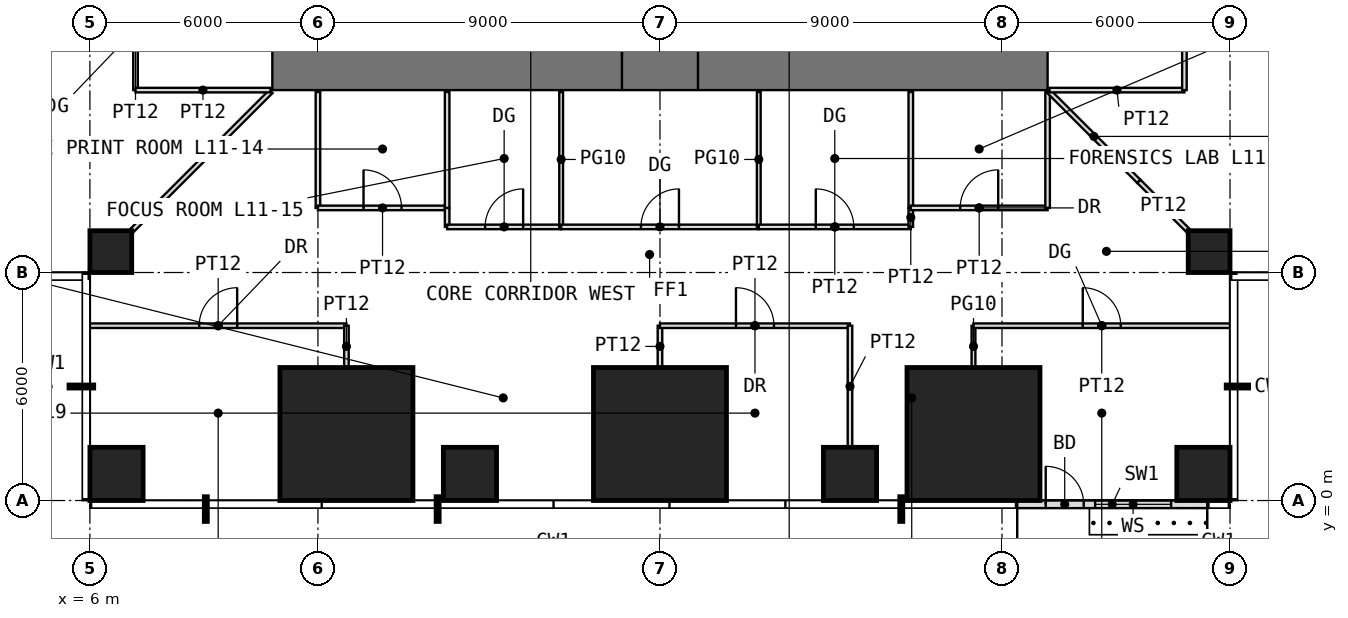
"""IFC4 building model, lengths in metres.
Left out: names, types, materials, properties, quantities, classifications, styles, units other than length and angle.
Written with IfcOpenShell. Run it as: python <this file> out.ifc"""

import sys

from ifc_helpers import new_model, si_unit, direction, frame, frame_2d, origin, origin_2d, place, context, subcontext, project, spatial, rectangle, extrude, element, fill, save


model = new_model("IFC4")
c1 = context("Model", 3, precision=1e-05, world=origin(), true_north=direction((0.0, 1.0)))
c2 = subcontext(c1, "Body", "Model", "MODEL_VIEW")
j1 = project(units=[si_unit("LENGTHUNIT", "METRE"), si_unit("PLANEANGLEUNIT", "RADIAN")], contexts=[c1])
p1 = place(None, origin())
s1 = spatial("IfcSite", under=j1, at=p1, CompositionType="ELEMENT")
p2 = place(p1, origin())
s2 = spatial("IfcBuilding", under=s1, at=p2, CompositionType="ELEMENT")
p3 = place(p2, frame((0.0, 0.0, 50.5)))
s3 = spatial("IfcBuildingStorey", under=s2, at=p3, CompositionType="ELEMENT", Elevation=50.5)
p4 = place(p3, frame((6.7, 0.7, 0.0), z_axis=(0.0, 0.0, 1.0), x_axis=(1.0, 0.0, 0.0)))
e1 = element("IfcColumn", 1, at=p4, inside=s3, PredefinedType="COLUMN", context=c2, shape_type="SweptSolid", body=[
    extrude(rectangle(XDim=1.4, YDim=1.4, at=origin_2d()), origin(), (0.0, 0.0, 1.0), 4.0),
])
p5 = place(p3, frame((12.75, 1.75, 0.0), z_axis=(0.0, 0.0, 1.0), x_axis=(1.0, 0.0, 0.0)))
e2 = element("IfcColumn", 2, at=p5, inside=s3, PredefinedType="COLUMN", context=c2, shape_type="SweptSolid", body=[
    extrude(rectangle(XDim=3.5, YDim=3.5, at=origin_2d()), origin(), (0.0, 0.0, 1.0), 4.0),
])
p6 = place(p3, frame((16.0, 0.7, 0.0), z_axis=(0.0, 0.0, 1.0), x_axis=(1.0, 0.0, 0.0)))
e3 = element("IfcColumn", 3, at=p6, inside=s3, PredefinedType="COLUMN", context=c2, shape_type="SweptSolid", body=[
    extrude(rectangle(XDim=1.4, YDim=1.4, at=origin_2d()), origin(), (0.0, 0.0, 1.0), 4.0),
])
p7 = place(p3, frame((21.0, 1.75, 0.0), z_axis=(0.0, 0.0, 1.0), x_axis=(1.0, 0.0, 0.0)))
e4 = element("IfcColumn", 4, at=p7, inside=s3, PredefinedType="COLUMN", context=c2, shape_type="SweptSolid", body=[
    extrude(rectangle(XDim=3.5, YDim=3.5, at=origin_2d()), origin(), (0.0, 0.0, 1.0), 4.0),
])
p8 = place(p3, frame((26.0, 0.7, 0.0), z_axis=(0.0, 0.0, 1.0), x_axis=(1.0, 0.0, 0.0)))
e5 = element("IfcColumn", 5, at=p8, inside=s3, PredefinedType="COLUMN", context=c2, shape_type="SweptSolid", body=[
    extrude(rectangle(XDim=1.4, YDim=1.4, at=origin_2d()), origin(), (0.0, 0.0, 1.0), 4.0),
])
p9 = place(p3, frame((29.25, 1.75, 0.0), z_axis=(0.0, 0.0, 1.0), x_axis=(1.0, 0.0, 0.0)))
e6 = element("IfcColumn", 6, at=p9, inside=s3, PredefinedType="COLUMN", context=c2, shape_type="SweptSolid", body=[
    extrude(rectangle(XDim=3.5, YDim=3.5, at=origin_2d()), origin(), (0.0, 0.0, 1.0), 4.0),
])
p10 = place(p3, frame((35.3, 0.7, 0.0), z_axis=(0.0, 0.0, 1.0), x_axis=(1.0, 0.0, 0.0)))
e7 = element("IfcColumn", 7, at=p10, inside=s3, PredefinedType="COLUMN", context=c2, shape_type="SweptSolid", body=[
    extrude(rectangle(XDim=1.4, YDim=1.4, at=origin_2d()), origin(), (0.0, 0.0, 1.0), 4.0),
])
for number, where, z_axis, x_axis in (
    (8, (6.55, 6.55, 0.0), (0.0, 0.0, 1.0), (1.0, 0.0, 0.0)),
    (9, (35.45, 6.55, 0.0), (0.0, 0.0, 1.0), (1.0, 0.0, 0.0)),
):
    element("IfcColumn", number, at=place(p3, frame(where, z_axis=z_axis, x_axis=x_axis)), inside=s3, PredefinedType="COLUMN", context=c2, shape_type="SweptSolid", body=[
        extrude(rectangle(XDim=1.1, YDim=1.1, at=origin_2d()), origin(), (0.0, 0.0, 1.0), 4.0),
    ])
p11 = place(p3, frame((30.4, -0.1, 0.0), z_axis=(0.0, 0.0, 1.0), x_axis=(1.0, 0.0, 0.0)))
e10 = element("IfcWall", 10, at=p11, inside=s3, PredefinedType="USERDEFINED", context=c2, shape_type="SweptSolid", body=[
    extrude(rectangle(XDim=5.0, YDim=0.2, at=frame_2d((2.5, 0.0))), origin(), (0.0, 0.0, 1.0), 3.75),
])
p12 = place(p11, frame((0.75, 0.0, 0.0)))
e11 = element("IfcOpeningElement", 11, at=p12, cuts=e10, PredefinedType="OPENING", context=c2, shape_type="SweptSolid", body=[
    extrude(rectangle(XDim=1.0, YDim=2.4, at=frame_2d((0.5, 1.2))), frame((0.0, 0.11, 0.0), z_axis=(0.0, -1.0, 0.0), x_axis=(1.0, 0.0, 0.0)), (0.0, 0.0, 1.0), 0.22),
])
p13 = place(p11, frame((2.05, 0.0, 0.3)))
e12 = element("IfcOpeningElement", 12, at=p13, cuts=e10, PredefinedType="OPENING", context=c2, shape_type="SweptSolid", body=[
    extrude(rectangle(XDim=2.0, YDim=2.7, at=frame_2d((1.0, 1.35))), frame((0.0, 0.11, 0.0), z_axis=(0.0, -1.0, 0.0), x_axis=(1.0, 0.0, 0.0)), (0.0, 0.0, 1.0), 0.22),
])
p14 = place(p3, frame((10.8, 11.7, -0.05), z_axis=(0.0, 0.0, 1.0), x_axis=(1.0, 0.0, 0.0)))
e13 = element("IfcWall", 13, at=p14, inside=s3, PredefinedType="SHEAR", context=c2, shape_type="SweptSolid", body=[
    extrude(rectangle(XDim=20.4, YDim=1.8, at=frame_2d((10.2, 0.0))), origin(), (0.0, 0.0, 1.0), 4.0),
])
p15 = place(p14, frame((9.2, 0.0, 0.05)))
e14 = element("IfcOpeningElement", 14, at=p15, cuts=e13, PredefinedType="OPENING", context=c2, shape_type="SweptSolid", body=[
    extrude(rectangle(XDim=2.0, YDim=2.2, at=frame_2d((1.0, 1.1))), frame((0.0, 0.91, 0.0), z_axis=(0.0, -1.0, 0.0), x_axis=(1.0, 0.0, 0.0)), (0.0, 0.0, 1.0), 1.82),
])
p16 = place(p3, frame((6.0, 4.6, 0.0), z_axis=(0.0, 0.0, 1.0), x_axis=(1.0, 0.0, 0.0)))
e15 = element("IfcWall", 15, at=p16, inside=s3, PredefinedType="PARTITIONING", context=c2, shape_type="SweptSolid", body=[
    extrude(rectangle(XDim=6.75, YDim=0.12, at=frame_2d((3.375, 0.0))), origin(), (0.0, 0.0, 1.0), 3.75),
])
p17 = place(p16, frame((2.875, 0.0, 0.0)))
e16 = element("IfcOpeningElement", 16, at=p17, cuts=e15, PredefinedType="OPENING", context=c2, shape_type="SweptSolid", body=[
    extrude(rectangle(XDim=1.0, YDim=2.2, at=frame_2d((0.5, 1.1))), frame((0.0, 0.07, 0.0), z_axis=(0.0, -1.0, 0.0), x_axis=(1.0, 0.0, 0.0)), (0.0, 0.0, 1.0), 0.14),
])
p18 = place(p3, frame((7.11, 7.11, 0.0), z_axis=(0.0, 0.0, 1.0), x_axis=(0.707106781187, 0.707106781187, 0.0)))
e17 = element("IfcWall", 17, at=p18, inside=s3, PredefinedType="PARTITIONING", context=c2, shape_type="SweptSolid", body=[
    extrude(rectangle(XDim=5.168, YDim=0.12, at=frame_2d((2.584, 0.0))), origin(), (0.0, 0.0, 1.0), 3.75),
])
p19 = place(p3, frame((7.2, 10.8, 0.0), z_axis=(0.0, 0.0, 1.0), x_axis=(0.0, 1.0, 0.0)))
e18 = element("IfcWall", 18, at=p19, inside=s3, PredefinedType="PARTITIONING", context=c2, shape_type="SweptSolid", body=[
    extrude(rectangle(XDim=3.2, YDim=0.12, at=frame_2d((1.6, 0.0))), origin(), (0.0, 0.0, 1.0), 3.75),
])
p20 = place(p19, frame((1.1, 0.0, 0.0)))
e19 = element("IfcOpeningElement", 19, at=p20, cuts=e18, PredefinedType="OPENING", context=c2, shape_type="SweptSolid", body=[
    extrude(rectangle(XDim=1.0, YDim=2.4, at=frame_2d((0.5, 1.2))), frame((0.0, 0.07, 0.0), z_axis=(0.0, -1.0, 0.0), x_axis=(1.0, 0.0, 0.0)), (0.0, 0.0, 1.0), 0.14),
])
p21 = place(p3, frame((7.2, 10.8, 0.0), z_axis=(0.0, 0.0, 1.0), x_axis=(1.0, 0.0, 0.0)))
e20 = element("IfcWall", 20, at=p21, inside=s3, PredefinedType="PARTITIONING", context=c2, shape_type="SweptSolid", body=[
    extrude(rectangle(XDim=3.55, YDim=0.12, at=frame_2d((1.775, 0.0))), origin(), (0.0, 0.0, 1.0), 3.75),
])
p22 = place(p3, frame((12.0, 7.7, 0.0), z_axis=(0.0, 0.0, 1.0), x_axis=(0.0, 1.0, 0.0)))
e21 = element("IfcWall", 21, at=p22, inside=s3, PredefinedType="PARTITIONING", context=c2, shape_type="SweptSolid", body=[
    extrude(rectangle(XDim=3.05, YDim=0.12, at=frame_2d((1.525, 0.0))), origin(), (0.0, 0.0, 1.0), 3.75),
])
p23 = place(p3, frame((12.0, 7.7, 0.0), z_axis=(0.0, 0.0, 1.0), x_axis=(1.0, 0.0, 0.0)))
e22 = element("IfcWall", 22, at=p23, inside=s3, PredefinedType="PARTITIONING", context=c2, shape_type="SweptSolid", body=[
    extrude(rectangle(XDim=3.4, YDim=0.12, at=frame_2d((1.7, 0.0))), origin(), (0.0, 0.0, 1.0), 3.75),
])
p24 = place(p23, frame((1.2, 0.0, 0.0)))
e23 = element("IfcOpeningElement", 23, at=p24, cuts=e22, PredefinedType="OPENING", context=c2, shape_type="SweptSolid", body=[
    extrude(rectangle(XDim=1.0, YDim=2.2, at=frame_2d((0.5, 1.1))), frame((0.0, 0.07, 0.0), z_axis=(0.0, -1.0, 0.0), x_axis=(1.0, 0.0, 0.0)), (0.0, 0.0, 1.0), 0.14),
])
p25 = place(p3, frame((12.75, 3.51, 0.0), z_axis=(0.0, 0.0, 1.0), x_axis=(0.0, 1.0, 0.0)))
e24 = element("IfcWall", 24, at=p25, inside=s3, PredefinedType="PARTITIONING", context=c2, shape_type="SweptSolid", body=[
    extrude(rectangle(XDim=1.09, YDim=0.12, at=frame_2d((0.545, 0.0))), origin(), (0.0, 0.0, 1.0), 3.75),
])
p26 = place(p3, frame((15.4, 7.2, 0.0), z_axis=(0.0, 0.0, 1.0), x_axis=(0.0, 1.0, 0.0)))
e25 = element("IfcWall", 25, at=p26, inside=s3, PredefinedType="PARTITIONING", context=c2, shape_type="SweptSolid", body=[
    extrude(rectangle(XDim=0.5, YDim=0.12, at=frame_2d((0.25, 0.0))), origin(), (0.0, 0.0, 1.0), 3.75),
])
p27 = place(p3, frame((15.4, 7.2, 0.0), z_axis=(0.0, 0.0, 1.0), x_axis=(1.0, 0.0, 0.0)))
e26 = element("IfcWall", 26, at=p27, inside=s3, PredefinedType="PARTITIONING", context=c2, shape_type="SweptSolid", body=[
    extrude(rectangle(XDim=3.0, YDim=0.12, at=frame_2d((1.5, 0.0))), origin(), (0.0, 0.0, 1.0), 3.75),
])
p28 = place(p27, frame((1.0, 0.0, 0.0)))
e27 = element("IfcOpeningElement", 27, at=p28, cuts=e26, PredefinedType="OPENING", context=c2, shape_type="SweptSolid", body=[
    extrude(rectangle(XDim=1.0, YDim=2.4, at=frame_2d((0.5, 1.2))), frame((0.0, 0.07, 0.0), z_axis=(0.0, -1.0, 0.0), x_axis=(1.0, 0.0, 0.0)), (0.0, 0.0, 1.0), 0.14),
])
p29 = place(p3, frame((15.4, 7.7, 0.0), z_axis=(0.0, 0.0, 1.0), x_axis=(0.0, 1.0, 0.0)))
e28 = element("IfcWall", 28, at=p29, inside=s3, PredefinedType="PARTITIONING", context=c2, shape_type="SweptSolid", body=[
    extrude(rectangle(XDim=3.05, YDim=0.12, at=frame_2d((1.525, 0.0))), origin(), (0.0, 0.0, 1.0), 3.75),
])
p30 = place(p3, frame((18.4, 7.2, 0.0), z_axis=(0.0, 0.0, 1.0), x_axis=(0.0, 1.0, 0.0)))
e29 = element("IfcWall", 29, at=p30, inside=s3, PredefinedType="PARTITIONING", context=c2, shape_type="SweptSolid", body=[
    extrude(rectangle(XDim=3.55, YDim=0.1, at=frame_2d((1.775, 0.0))), origin(), (0.0, 0.0, 1.0), 3.75),
])
p31 = place(p3, frame((18.4, 7.2, 0.0), z_axis=(0.0, 0.0, 1.0), x_axis=(1.0, 0.0, 0.0)))
e30 = element("IfcWall", 30, at=p31, inside=s3, PredefinedType="PARTITIONING", context=c2, shape_type="SweptSolid", body=[
    extrude(rectangle(XDim=5.2, YDim=0.12, at=frame_2d((2.6, 0.0))), origin(), (0.0, 0.0, 1.0), 3.75),
])
p32 = place(p31, frame((2.1, 0.0, 0.0)))
e31 = element("IfcOpeningElement", 31, at=p32, cuts=e30, PredefinedType="OPENING", context=c2, shape_type="SweptSolid", body=[
    extrude(rectangle(XDim=1.0, YDim=2.4, at=frame_2d((0.5, 1.2))), frame((0.0, 0.07, 0.0), z_axis=(0.0, -1.0, 0.0), x_axis=(1.0, 0.0, 0.0)), (0.0, 0.0, 1.0), 0.14),
])
p33 = place(p3, frame((21.0, 3.51, 0.0), z_axis=(0.0, 0.0, 1.0), x_axis=(0.0, 1.0, 0.0)))
e32 = element("IfcWall", 32, at=p33, inside=s3, PredefinedType="PARTITIONING", context=c2, shape_type="SweptSolid", body=[
    extrude(rectangle(XDim=1.09, YDim=0.12, at=frame_2d((0.545, 0.0))), origin(), (0.0, 0.0, 1.0), 3.75),
])
p34 = place(p3, frame((21.0, 4.6, 0.0), z_axis=(0.0, 0.0, 1.0), x_axis=(1.0, 0.0, 0.0)))
e33 = element("IfcWall", 33, at=p34, inside=s3, PredefinedType="PARTITIONING", context=c2, shape_type="SweptSolid", body=[
    extrude(rectangle(XDim=5.0, YDim=0.12, at=frame_2d((2.5, 0.0))), origin(), (0.0, 0.0, 1.0), 3.75),
])
p35 = place(p34, frame((2.0, 0.0, 0.0)))
e34 = element("IfcOpeningElement", 34, at=p35, cuts=e33, PredefinedType="OPENING", context=c2, shape_type="SweptSolid", body=[
    extrude(rectangle(XDim=1.0, YDim=2.2, at=frame_2d((0.5, 1.1))), frame((0.0, 0.07, 0.0), z_axis=(0.0, -1.0, 0.0), x_axis=(1.0, 0.0, 0.0)), (0.0, 0.0, 1.0), 0.14),
])
p36 = place(p3, frame((23.6, 7.2, 0.0), z_axis=(0.0, 0.0, 1.0), x_axis=(0.0, 1.0, 0.0)))
e35 = element("IfcWall", 35, at=p36, inside=s3, PredefinedType="PARTITIONING", context=c2, shape_type="SweptSolid", body=[
    extrude(rectangle(XDim=3.55, YDim=0.1, at=frame_2d((1.775, 0.0))), origin(), (0.0, 0.0, 1.0), 3.75),
])
p37 = place(p3, frame((23.6, 7.2, 0.0), z_axis=(0.0, 0.0, 1.0), x_axis=(1.0, 0.0, 0.0)))
e36 = element("IfcWall", 36, at=p37, inside=s3, PredefinedType="PARTITIONING", context=c2, shape_type="SweptSolid", body=[
    extrude(rectangle(XDim=4.0, YDim=0.12, at=frame_2d((2.0, 0.0))), origin(), (0.0, 0.0, 1.0), 3.75),
])
p38 = place(p37, frame((1.5, 0.0, 0.0)))
e37 = element("IfcOpeningElement", 37, at=p38, cuts=e36, PredefinedType="OPENING", context=c2, shape_type="SweptSolid", body=[
    extrude(rectangle(XDim=1.0, YDim=2.4, at=frame_2d((0.5, 1.2))), frame((0.0, 0.07, 0.0), z_axis=(0.0, -1.0, 0.0), x_axis=(1.0, 0.0, 0.0)), (0.0, 0.0, 1.0), 0.14),
])
p39 = place(p3, frame((26.0, 1.41, 0.0), z_axis=(0.0, 0.0, 1.0), x_axis=(0.0, 1.0, 0.0)))
e38 = element("IfcWall", 38, at=p39, inside=s3, PredefinedType="PARTITIONING", context=c2, shape_type="SweptSolid", body=[
    extrude(rectangle(XDim=3.19, YDim=0.12, at=frame_2d((1.595, 0.0))), origin(), (0.0, 0.0, 1.0), 3.75),
])
p40 = place(p3, frame((27.6, 7.2, 0.0), z_axis=(0.0, 0.0, 1.0), x_axis=(0.0, 1.0, 0.0)))
e39 = element("IfcWall", 39, at=p40, inside=s3, PredefinedType="PARTITIONING", context=c2, shape_type="SweptSolid", body=[
    extrude(rectangle(XDim=0.5, YDim=0.12, at=frame_2d((0.25, 0.0))), origin(), (0.0, 0.0, 1.0), 3.75),
])
p41 = place(p3, frame((27.6, 7.7, 0.0), z_axis=(0.0, 0.0, 1.0), x_axis=(0.0, 1.0, 0.0)))
e40 = element("IfcWall", 40, at=p41, inside=s3, PredefinedType="PARTITIONING", context=c2, shape_type="SweptSolid", body=[
    extrude(rectangle(XDim=3.05, YDim=0.12, at=frame_2d((1.525, 0.0))), origin(), (0.0, 0.0, 1.0), 3.75),
])
p42 = place(p3, frame((27.6, 7.7, 0.0), z_axis=(0.0, 0.0, 1.0), x_axis=(1.0, 0.0, 0.0)))
e41 = element("IfcWall", 41, at=p42, inside=s3, PredefinedType="PARTITIONING", context=c2, shape_type="SweptSolid", body=[
    extrude(rectangle(XDim=3.6, YDim=0.12, at=frame_2d((1.8, 0.0))), origin(), (0.0, 0.0, 1.0), 3.75),
])
p43 = place(p42, frame((1.3, 0.0, 0.0)))
e42 = element("IfcOpeningElement", 42, at=p43, cuts=e41, PredefinedType="OPENING", context=c2, shape_type="SweptSolid", body=[
    extrude(rectangle(XDim=1.0, YDim=2.2, at=frame_2d((0.5, 1.1))), frame((0.0, 0.07, 0.0), z_axis=(0.0, -1.0, 0.0), x_axis=(1.0, 0.0, 0.0)), (0.0, 0.0, 1.0), 0.14),
])
p44 = place(p3, frame((29.25, 3.51, 0.0), z_axis=(0.0, 0.0, 1.0), x_axis=(0.0, 1.0, 0.0)))
e43 = element("IfcWall", 43, at=p44, inside=s3, PredefinedType="PARTITIONING", context=c2, shape_type="SweptSolid", body=[
    extrude(rectangle(XDim=1.09, YDim=0.1, at=frame_2d((0.545, 0.0))), origin(), (0.0, 0.0, 1.0), 3.75),
])
p45 = place(p3, frame((29.25, 4.6, 0.0), z_axis=(0.0, 0.0, 1.0), x_axis=(1.0, 0.0, 0.0)))
e44 = element("IfcWall", 44, at=p45, inside=s3, PredefinedType="PARTITIONING", context=c2, shape_type="SweptSolid", body=[
    extrude(rectangle(XDim=6.75, YDim=0.12, at=frame_2d((3.375, 0.0))), origin(), (0.0, 0.0, 1.0), 3.75),
])
p46 = place(p45, frame((2.875, 0.0, 0.0)))
e45 = element("IfcOpeningElement", 45, at=p46, cuts=e44, PredefinedType="OPENING", context=c2, shape_type="SweptSolid", body=[
    extrude(rectangle(XDim=1.0, YDim=2.4, at=frame_2d((0.5, 1.2))), frame((0.0, 0.07, 0.0), z_axis=(0.0, -1.0, 0.0), x_axis=(1.0, 0.0, 0.0)), (0.0, 0.0, 1.0), 0.14),
])
p47 = place(p3, frame((31.2, 7.7, 0.0), z_axis=(0.0, 0.0, 1.0), x_axis=(0.0, 1.0, 0.0)))
e46 = element("IfcWall", 46, at=p47, inside=s3, PredefinedType="PARTITIONING", context=c2, shape_type="SweptSolid", body=[
    extrude(rectangle(XDim=3.05, YDim=0.12, at=frame_2d((1.525, 0.0))), origin(), (0.0, 0.0, 1.0), 3.75),
])
p48 = place(p3, frame((31.235, 10.765, 0.0), z_axis=(0.0, 0.0, 1.0), x_axis=(0.707106781187, -0.707106781187, 0.0)))
e47 = element("IfcWall", 47, at=p48, inside=s3, PredefinedType="PARTITIONING", context=c2, shape_type="SweptSolid", body=[
    extrude(rectangle(XDim=3.346, YDim=0.12, at=frame_2d((1.673, 0.0))), origin(), (0.0, 0.0, 1.0), 3.75),
])
p49 = place(p3, frame((31.25, 10.8, 0.0), z_axis=(0.0, 0.0, 1.0), x_axis=(1.0, 0.0, 0.0)))
e48 = element("IfcWall", 48, at=p49, inside=s3, PredefinedType="PARTITIONING", context=c2, shape_type="SweptSolid", body=[
    extrude(rectangle(XDim=3.55, YDim=0.12, at=frame_2d((1.775, 0.0))), origin(), (0.0, 0.0, 1.0), 3.75),
])
p50 = place(p3, frame((33.602, 8.398, 0.0), z_axis=(0.0, 0.0, 1.0), x_axis=(0.707106781187, -0.707106781187, 0.0)))
e49 = element("IfcWall", 49, at=p50, inside=s3, PredefinedType="PARTITIONING", context=c2, shape_type="SweptSolid", body=[
    extrude(rectangle(XDim=1.822, YDim=0.12, at=frame_2d((0.911, 0.0))), origin(), (0.0, 0.0, 1.0), 3.75),
])
p51 = place(p3, frame((34.8, 10.8, 0.0), z_axis=(0.0, 0.0, 1.0), x_axis=(0.0, 1.0, 0.0)))
e50 = element("IfcWall", 50, at=p51, inside=s3, PredefinedType="PARTITIONING", context=c2, shape_type="SweptSolid", body=[
    extrude(rectangle(XDim=3.3, YDim=0.12, at=frame_2d((1.65, 0.0))), origin(), (0.0, 0.0, 1.0), 3.75),
])
p52 = place(p51, frame((1.15, 0.0, 0.0)))
e51 = element("IfcOpeningElement", 51, at=p52, cuts=e50, PredefinedType="OPENING", context=c2, shape_type="SweptSolid", body=[
    extrude(rectangle(XDim=1.0, YDim=2.2, at=frame_2d((0.5, 1.1))), frame((0.0, 0.07, 0.0), z_axis=(0.0, -1.0, 0.0), x_axis=(1.0, 0.0, 0.0)), (0.0, 0.0, 1.0), 0.14),
])
p53 = place(p12, origin())
e52 = element("IfcDoor", 52, at=p53, inside=s3, OperationType="SINGLE_SWING_LEFT", PredefinedType="DOOR", context=c2, shape_type="SweptSolid", body=[
    extrude(rectangle(XDim=1.0, YDim=2.4, at=frame_2d((0.5, 1.2))), frame((0.0, 0.025, 0.0), z_axis=(0.0, -1.0, 0.0), x_axis=(1.0, 0.0, 0.0)), (0.0, 0.0, 1.0), 0.05),
])
fill(e11, e52)
p54 = place(p13, origin())
e53 = element("IfcWindow", 53, at=p54, inside=s3, PartitioningType="SINGLE_PANEL", PredefinedType="WINDOW", context=c2, shape_type="SweptSolid", body=[
    extrude(rectangle(XDim=2.0, YDim=2.7, at=frame_2d((1.0, 1.35))), frame((0.0, 0.03, 0.0), z_axis=(0.0, -1.0, 0.0), x_axis=(1.0, 0.0, 0.0)), (0.0, 0.0, 1.0), 0.06),
])
fill(e12, e53)
p55 = place(p15, origin())
e54 = element("IfcDoor", 54, at=p55, inside=s3, OperationType="DOUBLE_DOOR_SINGLE_SWING", PredefinedType="DOOR", context=c2, shape_type="SweptSolid", body=[
    extrude(rectangle(XDim=2.0, YDim=2.2, at=frame_2d((1.0, 1.1))), frame((0.0, 0.025, 0.0), z_axis=(0.0, -1.0, 0.0), x_axis=(1.0, 0.0, 0.0)), (0.0, 0.0, 1.0), 0.05),
])
fill(e14, e54)
p56 = place(p24, origin())
e55 = element("IfcDoor", 55, at=p56, inside=s3, OperationType="SINGLE_SWING_LEFT", PredefinedType="DOOR", context=c2, shape_type="SweptSolid", body=[
    extrude(rectangle(XDim=1.0, YDim=2.2, at=frame_2d((0.5, 1.1))), frame((0.0, 0.025, 0.0), z_axis=(0.0, -1.0, 0.0), x_axis=(1.0, 0.0, 0.0)), (0.0, 0.0, 1.0), 0.05),
])
fill(e23, e55)
p57 = place(p28, origin())
e56 = element("IfcDoor", 56, at=p57, inside=s3, OperationType="SINGLE_SWING_RIGHT", PredefinedType="DOOR", context=c2, shape_type="SweptSolid", body=[
    extrude(rectangle(XDim=1.0, YDim=2.4, at=frame_2d((0.5, 1.2))), frame((0.0, 0.025, 0.0), z_axis=(0.0, -1.0, 0.0), x_axis=(1.0, 0.0, 0.0)), (0.0, 0.0, 1.0), 0.05),
])
fill(e27, e56)
p58 = place(p38, origin())
e57 = element("IfcDoor", 57, at=p58, inside=s3, OperationType="SINGLE_SWING_LEFT", PredefinedType="DOOR", context=c2, shape_type="SweptSolid", body=[
    extrude(rectangle(XDim=1.0, YDim=2.4, at=frame_2d((0.5, 1.2))), frame((0.0, 0.025, 0.0), z_axis=(0.0, -1.0, 0.0), x_axis=(1.0, 0.0, 0.0)), (0.0, 0.0, 1.0), 0.05),
])
fill(e37, e57)
p59 = place(p43, origin())
e58 = element("IfcDoor", 58, at=p59, inside=s3, OperationType="SINGLE_SWING_RIGHT", PredefinedType="DOOR", context=c2, shape_type="SweptSolid", body=[
    extrude(rectangle(XDim=1.0, YDim=2.2, at=frame_2d((0.5, 1.1))), frame((0.0, 0.025, 0.0), z_axis=(0.0, -1.0, 0.0), x_axis=(1.0, 0.0, 0.0)), (0.0, 0.0, 1.0), 0.05),
])
fill(e42, e58)
p60 = place(p17, origin())
e59 = element("IfcDoor", 59, at=p60, inside=s3, OperationType="SINGLE_SWING_RIGHT", PredefinedType="DOOR", context=c2, shape_type="SweptSolid", body=[
    extrude(rectangle(XDim=1.0, YDim=2.2, at=frame_2d((0.5, 1.1))), frame((0.0, 0.025, 0.0), z_axis=(0.0, -1.0, 0.0), x_axis=(1.0, 0.0, 0.0)), (0.0, 0.0, 1.0), 0.05),
])
fill(e16, e59)
p61 = place(p35, origin())
e60 = element("IfcDoor", 60, at=p61, inside=s3, OperationType="SINGLE_SWING_LEFT", PredefinedType="DOOR", context=c2, shape_type="SweptSolid", body=[
    extrude(rectangle(XDim=1.0, YDim=2.2, at=frame_2d((0.5, 1.1))), frame((0.0, 0.025, 0.0), z_axis=(0.0, -1.0, 0.0), x_axis=(1.0, 0.0, 0.0)), (0.0, 0.0, 1.0), 0.05),
])
fill(e34, e60)
p62 = place(p46, origin())
e61 = element("IfcDoor", 61, at=p62, inside=s3, OperationType="SINGLE_SWING_LEFT", PredefinedType="DOOR", context=c2, shape_type="SweptSolid", body=[
    extrude(rectangle(XDim=1.0, YDim=2.4, at=frame_2d((0.5, 1.2))), frame((0.0, 0.025, 0.0), z_axis=(0.0, -1.0, 0.0), x_axis=(1.0, 0.0, 0.0)), (0.0, 0.0, 1.0), 0.05),
])
fill(e45, e61)
p63 = place(p32, origin())
e62 = element("IfcDoor", 62, at=p63, inside=s3, OperationType="SINGLE_SWING_RIGHT", PredefinedType="DOOR", context=c2, shape_type="SweptSolid", body=[
    extrude(rectangle(XDim=1.0, YDim=2.4, at=frame_2d((0.5, 1.2))), frame((0.0, 0.025, 0.0), z_axis=(0.0, -1.0, 0.0), x_axis=(1.0, 0.0, 0.0)), (0.0, 0.0, 1.0), 0.05),
])
fill(e31, e62)
save(model, sys.argv[1])
